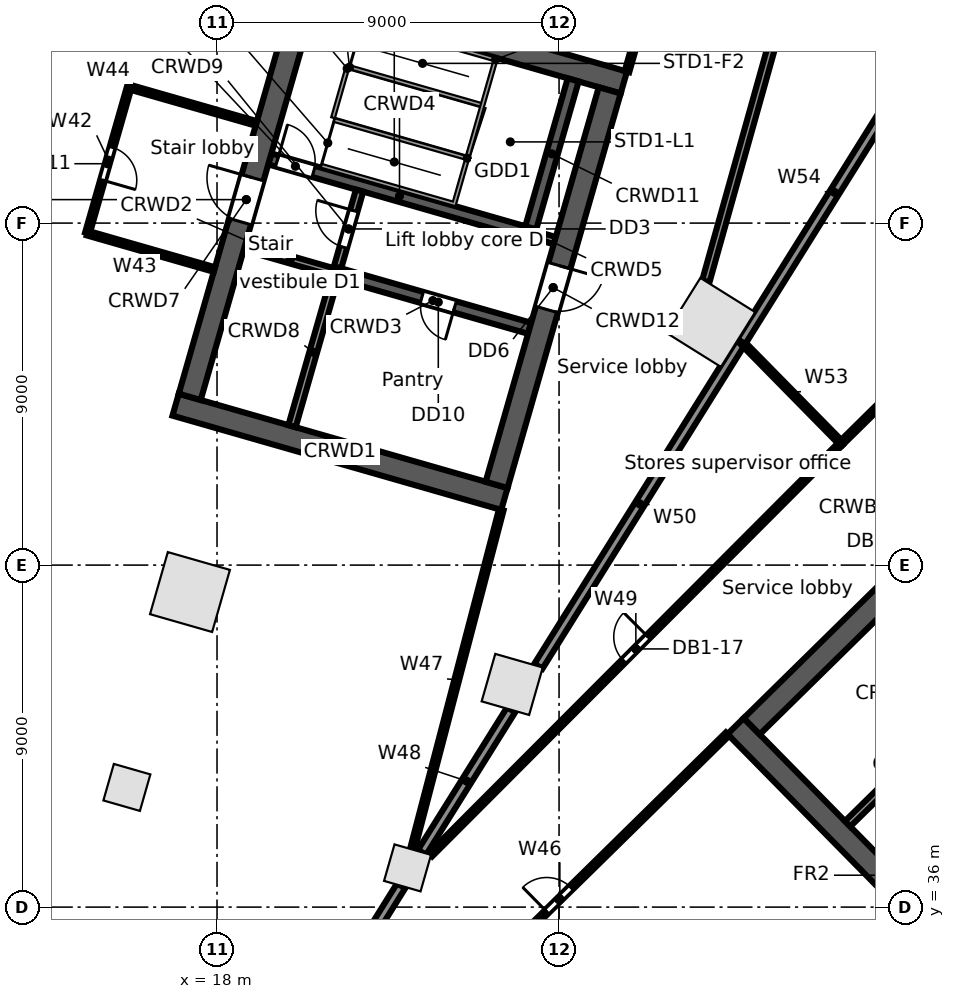
"""IFC4 building model, lengths in metres.
Left out: names, types, materials, properties, quantities, classifications, styles, units other than length and angle.
Written with IfcOpenShell. Run it as: python <this file> out.ifc"""

import sys

from ifc_helpers import new_model, si_unit, direction, frame, frame_2d, origin, origin_2d, place, context, subcontext, project, spatial, rectangle, extrude, element, fill, save


model = new_model("IFC4")
c1 = context("Model", 3, precision=1e-05, world=origin(), true_north=direction((0.0, 1.0)))
c2 = subcontext(c1, "Body", "Model", "MODEL_VIEW")
j1 = project(units=[si_unit("LENGTHUNIT", "METRE"), si_unit("PLANEANGLEUNIT", "RADIAN")], contexts=[c1])
p1 = place(None, origin())
s1 = spatial("IfcSite", under=j1, at=p1, CompositionType="ELEMENT")
p2 = place(p1, origin())
s2 = spatial("IfcBuilding", under=s1, at=p2, CompositionType="ELEMENT")
p3 = place(p2, frame((0.0, 0.0, -4.8)))
s3 = spatial("IfcBuildingStorey", under=s2, at=p3, CompositionType="ELEMENT", Elevation=-4.8)
p4 = place(p3, frame((1.961, 38.491, 0.0), z_axis=(0.0, 0.0, 1.0), x_axis=(0.961261264877, -0.275638859104, 0.0)))
e1 = element("IfcWall", 1, at=p4, inside=s3, PredefinedType="SOLIDWALL", context=c2, shape_type="SweptSolid", body=[
    extrude(rectangle(XDim=20.341, YDim=0.8, at=frame_2d((10.17, 0.0))), origin(), (0.0, 0.0, 1.0), 4.8),
])
p5 = place(p3, frame((17.288, 44.291, 0.0), z_axis=(0.0, 0.0, 1.0), x_axis=(0.961261695938, -0.275637355817, 0.0)))
e2 = element("IfcColumn", 2, at=p5, inside=s3, PredefinedType="COLUMN", context=c2, shape_type="SweptSolid", body=[
    extrude(rectangle(XDim=1.7, YDim=1.7, at=origin_2d()), origin(), (0.0, 0.0, 1.0), 4.8),
])
p6 = place(p3, frame((25.767, 41.86, 0.0), z_axis=(0.0, 0.0, 1.0), x_axis=(0.961261695938, -0.275637355817, 0.0)))
e3 = element("IfcColumn", 3, at=p6, inside=s3, PredefinedType="COLUMN", context=c2, shape_type="SweptSolid", body=[
    extrude(rectangle(XDim=1.3, YDim=1.3, at=origin_2d()), origin(), (0.0, 0.0, 1.0), 4.8),
])
p7 = place(p3, frame((30.99, 51.386, 0.0), z_axis=(0.0, 0.0, 1.0), x_axis=(0.529919264233, 0.848048096156, 0.0)))
e4 = element("IfcColumn", 4, at=p7, inside=s3, PredefinedType="COLUMN", context=c2, shape_type="SweptSolid", body=[
    extrude(rectangle(XDim=1.7, YDim=1.7, at=origin_2d()), origin(), (0.0, 0.0, 1.0), 4.8),
])
for number, where, z_axis, x_axis in (
    (5, (15.628, 39.149, 0.0), (0.0, 0.0, 1.0), (0.961, -0.276, 0.0)),
    (6, (23.013, 37.032, 0.0), (0.0, 0.0, 1.0), (0.961, -0.276, 0.0)),
):
    element("IfcColumn", number, at=place(p3, frame(where, z_axis=z_axis, x_axis=x_axis)), inside=s3, PredefinedType="COLUMN", context=c2, shape_type="SweptSolid", body=[
        extrude(rectangle(XDim=1.0, YDim=1.0, at=origin_2d()), origin(), (0.0, 0.0, 1.0), 4.8),
    ])
p8 = place(p3, frame((31.646, 40.763, 0.0), z_axis=(0.0, 0.0, 1.0), x_axis=(0.700911255944, -0.713248491965, 0.0)))
e7 = element("IfcWall", 7, at=p8, inside=s3, PredefinedType="SOLIDWALL", context=c2, shape_type="SweptSolid", body=[
    extrude(rectangle(XDim=15.0, YDim=0.6, at=frame_2d((7.5, 0.0))), origin(), (0.0, 0.0, 1.0), 4.35),
])
p9 = place(p8, frame((12.9, 0.0, 0.0)))
e8 = element("IfcOpeningElement", 8, at=p9, cuts=e7, PredefinedType="OPENING", context=c2, shape_type="SweptSolid", body=[
    extrude(rectangle(XDim=1.2, YDim=2.1, at=frame_2d((0.6, 1.05))), frame((0.0, 0.31, 0.0), z_axis=(0.0, -1.0, 0.0), x_axis=(1.0, 0.0, 0.0)), (0.0, 0.0, 1.0), 0.62),
])
p10 = place(p3, frame((32.07, 40.759, 0.0), z_axis=(0.0, 0.0, 1.0), x_axis=(0.713245344712, 0.70091445858, 0.0)))
e9 = element("IfcWall", 9, at=p10, inside=s3, PredefinedType="SOLIDWALL", context=c2, shape_type="SweptSolid", body=[
    extrude(rectangle(XDim=13.8, YDim=0.6, at=frame_2d((6.9, 0.0))), origin(), (0.0, 0.0, 1.0), 4.35),
])
p11 = place(p10, frame((6.3, 0.0, 0.0)))
e10 = element("IfcOpeningElement", 10, at=p11, cuts=e9, PredefinedType="OPENING", context=c2, shape_type="SweptSolid", body=[
    extrude(rectangle(XDim=1.2, YDim=2.1, at=frame_2d((0.6, 1.05))), frame((0.0, 0.31, 0.0), z_axis=(0.0, -1.0, 0.0), x_axis=(1.0, 0.0, 0.0)), (0.0, 0.0, 1.0), 0.62),
])
p12 = place(p3, frame((34.593, 38.191, 0.0), z_axis=(0.0, 0.0, 1.0), x_axis=(0.713252216116, 0.700907466222, 0.0)))
e11 = element("IfcWall", 11, at=p12, inside=s3, PredefinedType="SOLIDWALL", context=c2, shape_type="SweptSolid", body=[
    extrude(rectangle(XDim=4.45, YDim=0.2, at=frame_2d((2.225, 0.0))), origin(), (0.0, 0.0, 1.0), 4.35),
])
p13 = place(p3, frame((16.911, 49.221, 0.0), z_axis=(0.0, 0.0, 1.0), x_axis=(0.96126248289, -0.275634611374, 0.0)))
e12 = element("IfcWall", 12, at=p13, inside=s3, PredefinedType="SOLIDWALL", context=c2, shape_type="SweptSolid", body=[
    extrude(rectangle(XDim=9.0, YDim=0.6, at=frame_2d((4.5, 0.0))), origin(), (0.0, 0.0, 1.0), 4.35),
])
p14 = place(p3, frame((18.728, 53.382, 0.0), z_axis=(0.0, 0.0, 1.0), x_axis=(0.961247070632, -0.275688355216, 0.0)))
e13 = element("IfcWall", 13, at=p14, inside=s3, PredefinedType="SOLIDWALL", context=c2, shape_type="SweptSolid", body=[
    extrude(rectangle(XDim=2.5, YDim=0.2, at=frame_2d((1.25, 0.0))), origin(), (0.0, 0.0, 1.0), 4.35),
])
p15 = place(p3, frame((21.131, 52.692, 0.0), z_axis=(0.0, 0.0, 1.0), x_axis=(0.961271492568, -0.275603188616, 0.0)))
e14 = element("IfcWall", 14, at=p15, inside=s3, PredefinedType="SOLIDWALL", context=c2, shape_type="SweptSolid", body=[
    extrude(rectangle(XDim=5.3, YDim=0.3, at=frame_2d((2.65, 0.0))), origin(), (0.0, 0.0, 1.0), 4.35),
])
p16 = place(p15, frame((2.35, 0.0, 0.0)))
e15 = element("IfcOpeningElement", 15, at=p16, cuts=e14, PredefinedType="OPENING", context=c2, shape_type="SweptSolid", body=[
    extrude(rectangle(XDim=0.9, YDim=2.1, at=frame_2d((0.45, 1.05))), frame((0.0, 0.16, 0.0), z_axis=(0.0, -1.0, 0.0), x_axis=(1.0, 0.0, 0.0)), (0.0, 0.0, 1.0), 0.32),
])
p17 = place(p3, frame((19.389, 55.689, 0.0), z_axis=(0.0, 0.0, 1.0), x_axis=(0.961261397636, -0.275638396117, 0.0)))
e16 = element("IfcWall", 16, at=p17, inside=s3, PredefinedType="SOLIDWALL", context=c2, shape_type="SweptSolid", body=[
    extrude(rectangle(XDim=7.1, YDim=0.3, at=frame_2d((3.55, 0.0))), origin(), (0.0, 0.0, 1.0), 4.35),
])
p18 = place(p17, frame((0.2, 0.0, 0.0)))
e17 = element("IfcOpeningElement", 17, at=p18, cuts=e16, PredefinedType="OPENING", context=c2, shape_type="SweptSolid", body=[
    extrude(rectangle(XDim=1.0, YDim=2.1, at=frame_2d((0.5, 1.05))), frame((0.0, 0.16, 0.0), z_axis=(0.0, -1.0, 0.0), x_axis=(1.0, 0.0, 0.0)), (0.0, 0.0, 1.0), 0.32),
])
p19 = place(p3, frame((26.214, 53.732, 0.0), z_axis=(0.0, 0.0, 1.0), x_axis=(0.96122076476, -0.27578005982, 0.0)))
e18 = element("IfcWall", 18, at=p19, inside=s3, PredefinedType="SOLIDWALL", context=c2, shape_type="SweptSolid", body=[
    extrude(rectangle(XDim=0.7, YDim=0.2, at=frame_2d((0.35, 0.0))), origin(), (0.0, 0.0, 1.0), 4.35),
])
p20 = place(p3, frame((20.053, 60.18, 0.0), z_axis=(0.0, 0.0, 1.0), x_axis=(0.96126248289, -0.275634611374, 0.0)))
e19 = element("IfcWall", 19, at=p20, inside=s3, PredefinedType="SOLIDWALL", context=c2, shape_type="SweptSolid", body=[
    extrude(rectangle(XDim=9.0, YDim=0.6, at=frame_2d((4.5, 0.0))), origin(), (0.0, 0.0, 1.0), 4.35),
])
p21 = place(p3, frame((17.282, 49.427, 0.0), z_axis=(0.0, 0.0, 1.0), x_axis=(0.275631631629, 0.961263337304, 0.0)))
e20 = element("IfcWall", 20, at=p21, inside=s3, PredefinedType="SOLIDWALL", context=c2, shape_type="SweptSolid", body=[
    extrude(rectangle(XDim=10.8, YDim=0.6, at=frame_2d((5.4, 0.0))), origin(), (0.0, 0.0, 1.0), 4.35),
])
p22 = place(p21, frame((4.8, 0.0, 0.0)))
e21 = element("IfcOpeningElement", 21, at=p22, cuts=e20, PredefinedType="OPENING", context=c2, shape_type="SweptSolid", body=[
    extrude(rectangle(XDim=1.2, YDim=2.1, at=frame_2d((0.6, 1.05))), frame((0.0, 0.31, 0.0), z_axis=(0.0, -1.0, 0.0), x_axis=(1.0, 0.0, 0.0)), (0.0, 0.0, 1.0), 0.62),
])
p23 = place(p3, frame((19.973, 48.655, 0.0), z_axis=(0.0, 0.0, 1.0), x_axis=(0.275668441653, 0.961252781674, 0.0)))
e22 = element("IfcWall", 22, at=p23, inside=s3, PredefinedType="SOLIDWALL", context=c2, shape_type="SweptSolid", body=[
    extrude(rectangle(XDim=4.05, YDim=0.2, at=frame_2d((2.025, 0.0))), origin(), (0.0, 0.0, 1.0), 4.35),
])
p24 = place(p3, frame((21.172, 52.837, 0.0), z_axis=(0.0, 0.0, 1.0), x_axis=(0.275657676022, 0.961255868981, 0.0)))
e23 = element("IfcWall", 23, at=p24, inside=s3, PredefinedType="PARTITIONING", context=c2, shape_type="SweptSolid", body=[
    extrude(rectangle(XDim=2.1, YDim=0.2, at=frame_2d((1.05, 0.0))), origin(), (0.0, 0.0, 1.0), 4.35),
])
p25 = place(p24, frame((0.55, 0.0, 0.0)))
e24 = element("IfcOpeningElement", 24, at=p25, cuts=e23, PredefinedType="OPENING", context=c2, shape_type="SweptSolid", body=[
    extrude(rectangle(XDim=1.0, YDim=2.1, at=frame_2d((0.5, 1.05))), frame((0.0, 0.11, 0.0), z_axis=(0.0, -1.0, 0.0), x_axis=(1.0, 0.0, 0.0)), (0.0, 0.0, 1.0), 0.22),
])
p26 = place(p3, frame((26.256, 53.876, 0.0), z_axis=(0.0, 0.0, 1.0), x_axis=(0.275612739511, 0.961268754209, 0.0)))
e25 = element("IfcWall", 25, at=p26, inside=s3, PredefinedType="SOLIDWALL", context=c2, shape_type="SweptSolid", body=[
    extrude(rectangle(XDim=4.05, YDim=0.3, at=frame_2d((2.025, 0.0))), origin(), (0.0, 0.0, 1.0), 4.35),
])
p27 = place(p3, frame((25.356, 47.112, 0.0), z_axis=(0.0, 0.0, 1.0), x_axis=(0.275631631629, 0.961263337304, 0.0)))
e26 = element("IfcWall", 26, at=p27, inside=s3, PredefinedType="SOLIDWALL", context=c2, shape_type="SweptSolid", body=[
    extrude(rectangle(XDim=10.8, YDim=0.6, at=frame_2d((5.4, 0.0))), origin(), (0.0, 0.0, 1.0), 4.35),
])
p28 = place(p27, frame((4.8, 0.0, 0.0)))
e27 = element("IfcOpeningElement", 27, at=p28, cuts=e26, PredefinedType="OPENING", context=c2, shape_type="SweptSolid", body=[
    extrude(rectangle(XDim=1.2, YDim=2.1, at=frame_2d((0.6, 1.05))), frame((0.0, 0.31, 0.0), z_axis=(0.0, -1.0, 0.0), x_axis=(1.0, 0.0, 0.0)), (0.0, 0.0, 1.0), 0.62),
])
p29 = place(p3, frame((14.589, 53.736, 0.0), z_axis=(0.0, 0.0, 1.0), x_axis=(0.275470792429, 0.961309441605, 0.0)))
e28 = element("IfcWall", 28, at=p29, inside=s3, PredefinedType="PARTITIONING", context=c2, shape_type="SweptSolid", body=[
    extrude(rectangle(XDim=4.0, YDim=0.125, at=frame_2d((2.0, 0.0))), origin(), (0.0, 0.0, 1.0), 3.412),
])
p30 = place(p29, frame((1.45, 0.0, 0.0)))
e29 = element("IfcOpeningElement", 29, at=p30, cuts=e28, PredefinedType="OPENING", context=c2, shape_type="SweptSolid", body=[
    extrude(rectangle(XDim=0.9, YDim=2.1, at=frame_2d((0.45, 1.05))), frame((0.0, 0.073, 0.0), z_axis=(0.0, -1.0, 0.0), x_axis=(1.0, 0.0, 0.0)), (0.0, 0.0, 1.0), 0.145),
])
p31 = place(p3, frame((14.589, 53.736, 0.0), z_axis=(0.0, 0.0, 1.0), x_axis=(0.961258417425, -0.275648789095, 0.0)))
e30 = element("IfcWall", 30, at=p31, inside=s3, PredefinedType="PARTITIONING", context=c2, shape_type="SweptSolid", body=[
    extrude(rectangle(XDim=3.476, YDim=0.125, at=frame_2d((1.738, 0.0))), origin(), (0.0, 0.0, 1.0), 4.35),
])
p32 = place(p3, frame((15.691, 57.581, 0.0), z_axis=(0.0, 0.0, 1.0), x_axis=(0.9612850915, -0.275555752725, 0.0)))
e31 = element("IfcWall", 31, at=p32, inside=s3, PredefinedType="PARTITIONING", context=c2, shape_type="SweptSolid", body=[
    extrude(rectangle(XDim=3.477, YDim=0.125, at=frame_2d((1.738, 0.0))), origin(), (0.0, 0.0, 1.0), 3.412),
])
p33 = place(p3, frame((20.916, 33.472, 0.0), z_axis=(0.0, 0.0, 1.0), x_axis=(0.529775918086, 0.848137651927, 0.0)))
e32 = element("IfcWall", 32, at=p33, inside=s3, PredefinedType="PARTITIONING", context=c2, shape_type="SweptSolid", body=[
    extrude(rectangle(XDim=3.641, YDim=0.25, at=frame_2d((1.821, 0.0))), origin(), (0.0, 0.0, 1.0), 4.35),
])
p34 = place(p3, frame((22.61, 31.884, 0.0), z_axis=(0.0, 0.0, 1.0), x_axis=(0.71329764845, 0.700861230712, 0.0)))
e33 = element("IfcWall", 33, at=p34, inside=s3, PredefinedType="PARTITIONING", context=c2, shape_type="SweptSolid", body=[
    extrude(rectangle(XDim=12.368, YDim=0.125, at=frame_2d((6.184, 0.0))), origin(), (0.0, 0.0, 1.0), 3.63),
])
p35 = place(p34, frame((5.7, 0.0, 0.0)))
e34 = element("IfcOpeningElement", 34, at=p35, cuts=e33, PredefinedType="OPENING", context=c2, shape_type="SweptSolid", body=[
    extrude(rectangle(XDim=0.9, YDim=2.1, at=frame_2d((0.45, 1.05))), frame((0.0, 0.073, 0.0), z_axis=(0.0, -1.0, 0.0), x_axis=(1.0, 0.0, 0.0)), (0.0, 0.0, 1.0), 0.145),
])
p36 = place(p3, frame((23.139, 37.516, 0.0), z_axis=(0.0, 0.0, 1.0), x_axis=(0.253335246865, 0.967378546741, 0.0)))
e35 = element("IfcWall", 35, at=p36, inside=s3, PredefinedType="PARTITIONING", context=c2, shape_type="SweptSolid", body=[
    extrude(rectangle(XDim=9.237, YDim=0.125, at=frame_2d((4.619, 0.0))), origin(), (0.0, 0.0, 1.0), 3.63),
])
p37 = place(p3, frame((23.396, 37.442, 0.0), z_axis=(0.0, 0.0, 1.0), x_axis=(0.529879823435, 0.848072740227, 0.0)))
e36 = element("IfcWall", 36, at=p37, inside=s3, PredefinedType="PARTITIONING", context=c2, shape_type="SweptSolid", body=[
    extrude(rectangle(XDim=4.422, YDim=0.25, at=frame_2d((2.211, 0.0))), origin(), (0.0, 0.0, 1.0), 3.412),
])
p38 = place(p3, frame((23.618, 37.379, 0.0), z_axis=(0.0, 0.0, 1.0), x_axis=(0.706356332605, 0.707856434165, 0.0)))
e37 = element("IfcWall", 37, at=p38, inside=s3, PredefinedType="PARTITIONING", context=c2, shape_type="SweptSolid", body=[
    extrude(rectangle(XDim=15.298, YDim=0.125, at=frame_2d((7.649, 0.0))), origin(), (0.0, 0.0, 1.0), 3.418),
])
p39 = place(p38, frame((7.2, 0.0, 0.0)))
e38 = element("IfcOpeningElement", 38, at=p39, cuts=e37, PredefinedType="OPENING", context=c2, shape_type="SweptSolid", body=[
    extrude(rectangle(XDim=0.9, YDim=2.1, at=frame_2d((0.45, 1.05))), frame((0.0, 0.073, 0.0), z_axis=(0.0, -1.0, 0.0), x_axis=(1.0, 0.0, 0.0)), (0.0, 0.0, 1.0), 0.145),
])
p40 = place(p3, frame((26.456, 42.338, 0.0), z_axis=(0.0, 0.0, 1.0), x_axis=(0.529866075757, 0.848081329686, 0.0)))
e39 = element("IfcWall", 39, at=p40, inside=s3, PredefinedType="PARTITIONING", context=c2, shape_type="SweptSolid", body=[
    extrude(rectangle(XDim=10.076, YDim=0.25, at=frame_2d((5.038, 0.0))), origin(), (0.0, 0.0, 1.0), 3.412),
])
p41 = place(p3, frame((28.787, 57.987, 0.0), z_axis=(0.0, 0.0, 1.0), x_axis=(0.27563893724, 0.961261242471, 0.0)))
e40 = element("IfcWall", 40, at=p41, inside=s3, PredefinedType="PARTITIONING", context=c2, shape_type="SweptSolid", body=[
    extrude(rectangle(XDim=13.735, YDim=0.125, at=frame_2d((6.867, 0.0))), origin(), (0.0, 0.0, 1.0), 3.53),
])
p42 = place(p41, frame((6.45, 0.0, 0.0)))
e41 = element("IfcOpeningElement", 41, at=p42, cuts=e40, PredefinedType="OPENING", context=c2, shape_type="SweptSolid", body=[
    extrude(rectangle(XDim=0.9, YDim=2.1, at=frame_2d((0.45, 1.05))), frame((0.0, 0.073, 0.0), z_axis=(0.0, -1.0, 0.0), x_axis=(1.0, 0.0, 0.0)), (0.0, 0.0, 1.0), 0.145),
])
p43 = place(p3, frame((30.862, 52.468, 0.0), z_axis=(0.0, 0.0, 1.0), x_axis=(0.269850069582, 0.962902352238, 0.0)))
e42 = element("IfcWall", 42, at=p43, inside=s3, PredefinedType="PARTITIONING", context=c2, shape_type="SweptSolid", body=[
    extrude(rectangle(XDim=18.469, YDim=0.2, at=frame_2d((9.234, 0.0))), origin(), (0.0, 0.0, 1.0), 3.53),
])
p44 = place(p43, frame((8.7, 0.0, 0.0)))
e43 = element("IfcOpeningElement", 43, at=p44, cuts=e42, PredefinedType="OPENING", context=c2, shape_type="SweptSolid", body=[
    extrude(rectangle(XDim=1.0, YDim=2.1, at=frame_2d((0.5, 1.05))), frame((0.0, 0.11, 0.0), z_axis=(0.0, -1.0, 0.0), x_axis=(1.0, 0.0, 0.0)), (0.0, 0.0, 1.0), 0.22),
])
p45 = place(p3, frame((31.795, 50.883, 0.0), z_axis=(0.0, 0.0, 1.0), x_axis=(0.700961783082, -0.713198835289, 0.0)))
e44 = element("IfcWall", 44, at=p45, inside=s3, PredefinedType="PARTITIONING", context=c2, shape_type="SweptSolid", body=[
    extrude(rectangle(XDim=3.751, YDim=0.125, at=frame_2d((1.875, 0.0))), origin(), (0.0, 0.0, 1.0), 3.418),
])
p46 = place(p3, frame((31.795, 50.883, 0.0), z_axis=(0.0, 0.0, 1.0), x_axis=(0.529939676421, 0.848035340864, 0.0)))
e45 = element("IfcWall", 45, at=p46, inside=s3, PredefinedType="PARTITIONING", context=c2, shape_type="SweptSolid", body=[
    extrude(rectangle(XDim=9.258, YDim=0.25, at=frame_2d((4.629, 0.0))), origin(), (0.0, 0.0, 1.0), 3.418),
])
p47 = place(p3, frame((33.916, 20.378, 0.0), z_axis=(0.0, 0.0, 1.0), x_axis=(0.857167223985, 0.515038202589, 0.0)))
e46 = element("IfcWall", 46, at=p47, inside=s3, PredefinedType="PARTITIONING", context=c2, shape_type="SweptSolid", body=[
    extrude(rectangle(XDim=39.374, YDim=0.125, at=frame_2d((19.687, 0.0))), origin(), (0.0, 0.0, 1.0), 3.418),
])
p48 = place(p3, frame((34.424, 48.208, 0.0), z_axis=(0.0, 0.0, 1.0), x_axis=(0.711998848244, 0.702180632102, 0.0)))
e47 = element("IfcWall", 47, at=p48, inside=s3, PredefinedType="PARTITIONING", context=c2, shape_type="SweptSolid", body=[
    extrude(rectangle(XDim=19.868, YDim=0.125, at=frame_2d((9.934, 0.0))), origin(), (0.0, 0.0, 1.0), 3.522),
])
p49 = place(p48, frame((9.45, 0.0, 0.0)))
e48 = element("IfcOpeningElement", 48, at=p49, cuts=e47, PredefinedType="OPENING", context=c2, shape_type="SweptSolid", body=[
    extrude(rectangle(XDim=0.9, YDim=2.1, at=frame_2d((0.45, 1.05))), frame((0.0, 0.073, 0.0), z_axis=(0.0, -1.0, 0.0), x_axis=(1.0, 0.0, 0.0)), (0.0, 0.0, 1.0), 0.145),
])
p50 = place(p18, origin())
e49 = element("IfcDoor", 49, at=p50, inside=s3, OperationType="SINGLE_SWING_LEFT", PredefinedType="DOOR", context=c2, shape_type="SweptSolid", body=[
    extrude(rectangle(XDim=1.0, YDim=2.1, at=frame_2d((0.5, 1.05))), frame((0.0, 0.025, 0.0), z_axis=(0.0, -1.0, 0.0), x_axis=(1.0, 0.0, 0.0)), (0.0, 0.0, 1.0), 0.05),
])
fill(e17, e49)
p51 = place(p25, origin())
e50 = element("IfcDoor", 50, at=p51, inside=s3, OperationType="SINGLE_SWING_RIGHT", PredefinedType="DOOR", context=c2, shape_type="SweptSolid", body=[
    extrude(rectangle(XDim=1.0, YDim=2.1, at=frame_2d((0.5, 1.05))), frame((0.0, 0.025, 0.0), z_axis=(0.0, -1.0, 0.0), x_axis=(1.0, 0.0, 0.0)), (0.0, 0.0, 1.0), 0.05),
])
fill(e24, e50)
p52 = place(p22, origin())
e51 = element("IfcDoor", 51, at=p52, inside=s3, OperationType="SINGLE_SWING_RIGHT", PredefinedType="DOOR", context=c2, shape_type="SweptSolid", body=[
    extrude(rectangle(XDim=1.2, YDim=2.1, at=frame_2d((0.6, 1.05))), frame((0.0, 0.025, 0.0), z_axis=(0.0, -1.0, 0.0), x_axis=(1.0, 0.0, 0.0)), (0.0, 0.0, 1.0), 0.05),
])
fill(e21, e51)
p53 = place(p28, frame((1.2, 0.0, 0.0), z_axis=(0.0, 0.0, 1.0), x_axis=(-1.0, 0.0, 0.0)))
e52 = element("IfcDoor", 52, at=p53, inside=s3, OperationType="SINGLE_SWING_LEFT", PredefinedType="DOOR", context=c2, shape_type="SweptSolid", body=[
    extrude(rectangle(XDim=1.2, YDim=2.1, at=frame_2d((0.6, 1.05))), frame((0.0, 0.025, 0.0), z_axis=(0.0, -1.0, 0.0), x_axis=(1.0, 0.0, 0.0)), (0.0, 0.0, 1.0), 0.05),
])
fill(e27, e52)
p54 = place(p16, frame((0.9, 0.0, 0.0), z_axis=(0.0, 0.0, 1.0), x_axis=(-1.0, 0.0, 0.0)))
e53 = element("IfcDoor", 53, at=p54, inside=s3, OperationType="SINGLE_SWING_LEFT", PredefinedType="DOOR", context=c2, shape_type="SweptSolid", body=[
    extrude(rectangle(XDim=0.9, YDim=2.1, at=frame_2d((0.45, 1.05))), frame((0.0, 0.025, 0.0), z_axis=(0.0, -1.0, 0.0), x_axis=(1.0, 0.0, 0.0)), (0.0, 0.0, 1.0), 0.05),
])
fill(e15, e53)
p55 = place(p30, frame((0.9, 0.0, 0.0), z_axis=(0.0, 0.0, 1.0), x_axis=(-1.0, 0.0, 0.0)))
e54 = element("IfcDoor", 54, at=p55, inside=s3, OperationType="SINGLE_SWING_RIGHT", PredefinedType="DOOR", context=c2, shape_type="SweptSolid", body=[
    extrude(rectangle(XDim=0.9, YDim=2.1, at=frame_2d((0.45, 1.05))), frame((0.0, 0.025, 0.0), z_axis=(0.0, -1.0, 0.0), x_axis=(1.0, 0.0, 0.0)), (0.0, 0.0, 1.0), 0.05),
])
fill(e29, e54)
p56 = place(p35, origin())
e55 = element("IfcDoor", 55, at=p56, inside=s3, OperationType="SINGLE_SWING_LEFT", PredefinedType="DOOR", context=c2, shape_type="SweptSolid", body=[
    extrude(rectangle(XDim=0.9, YDim=2.1, at=frame_2d((0.45, 1.05))), frame((0.0, 0.025, 0.0), z_axis=(0.0, -1.0, 0.0), x_axis=(1.0, 0.0, 0.0)), (0.0, 0.0, 1.0), 0.05),
])
fill(e34, e55)
p57 = place(p39, origin())
e56 = element("IfcDoor", 56, at=p57, inside=s3, OperationType="SINGLE_SWING_RIGHT", PredefinedType="DOOR", context=c2, shape_type="SweptSolid", body=[
    extrude(rectangle(XDim=0.9, YDim=2.1, at=frame_2d((0.45, 1.05))), frame((0.0, 0.025, 0.0), z_axis=(0.0, -1.0, 0.0), x_axis=(1.0, 0.0, 0.0)), (0.0, 0.0, 1.0), 0.05),
])
fill(e38, e56)
save(model, sys.argv[1])
